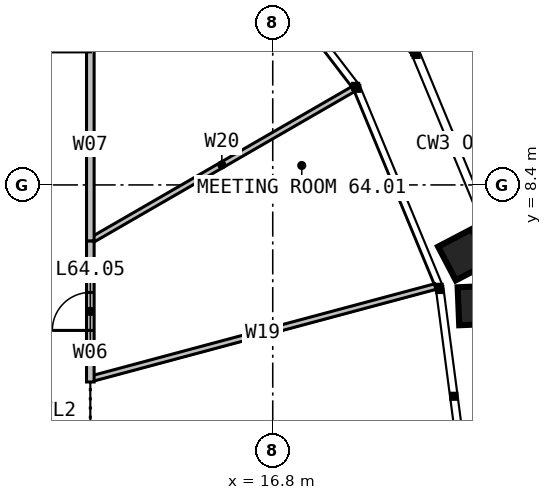
"""IFC4 building model, lengths in metres.
Left out: names, types, materials, properties, quantities, classifications, styles, units other than length and angle.
Written with IfcOpenShell. Run it as: python <this file> out.ifc"""

import sys

from ifc_helpers import new_model, si_unit, direction, frame, frame_2d, origin, place, context, subcontext, project, spatial, rectangle, extrude, element, fill, save


model = new_model("IFC4")
c1 = context("Model", 3, precision=1e-05, world=origin(), true_north=direction((0.0, 1.0)))
c2 = subcontext(c1, "Body", "Model", "MODEL_VIEW")
j1 = project(units=[si_unit("LENGTHUNIT", "METRE"), si_unit("PLANEANGLEUNIT", "RADIAN")], contexts=[c1])
p1 = place(None, origin())
s1 = spatial("IfcSite", under=j1, at=p1, CompositionType="ELEMENT")
p2 = place(p1, origin())
s2 = spatial("IfcBuilding", under=s1, at=p2, CompositionType="ELEMENT")
p3 = place(p2, frame((0.0, 0.0, 264.0)))
s3 = spatial("IfcBuildingStorey", under=s2, at=p3, CompositionType="ELEMENT", Elevation=264.0)
p4 = place(p3, frame((11.98, 3.288, 0.0), z_axis=(0.0, 0.0, 1.0), x_axis=(0.96592469552, 0.258823265155, 0.0)))
e1 = element("IfcWall", 1, at=p4, inside=s3, PredefinedType="PARTITIONING", context=c2, shape_type="SweptSolid", body=[
    extrude(rectangle(XDim=9.425, YDim=0.15, at=frame_2d((4.712, 0.0))), origin(), (0.0, 0.0, 1.0), 2.79),
])
p5 = place(p3, frame((12.0, 6.928, 0.0), z_axis=(0.0, 0.0, 1.0), x_axis=(0.86602940896, 0.499993062769, 0.0)))
e2 = element("IfcWall", 2, at=p5, inside=s3, PredefinedType="PARTITIONING", context=c2, shape_type="SweptSolid", body=[
    extrude(rectangle(XDim=7.992, YDim=0.15, at=frame_2d((3.996, 0.0))), origin(), (0.0, 0.0, 1.0), 2.79),
])
p6 = place(p3, frame((12.0, 3.215, 0.0), z_axis=(0.0, 0.0, 1.0), x_axis=(0.0, 1.0, 0.0)))
e3 = element("IfcWall", 3, at=p6, inside=s3, PredefinedType="PARTITIONING", context=c2, shape_type="SweptSolid", body=[
    extrude(rectangle(XDim=3.713, YDim=0.2, at=frame_2d((1.856, 0.0))), origin(), (0.0, 0.0, 1.0), 3.8),
])
p7 = place(p6, frame((1.356, 0.0, 0.0)))
e4 = element("IfcOpeningElement", 4, at=p7, cuts=e3, PredefinedType="OPENING", context=c2, shape_type="SweptSolid", body=[
    extrude(rectangle(XDim=1.0, YDim=2.2, at=frame_2d((0.5, 1.1))), frame((0.0, 0.11, 0.0), z_axis=(0.0, -1.0, 0.0), x_axis=(1.0, 0.0, 0.0)), (0.0, 0.0, 1.0), 0.22),
])
p8 = place(p3, frame((12.0, 6.928, 0.0), z_axis=(0.0, 0.0, 1.0), x_axis=(0.0, 1.0, 0.0)))
e5 = element("IfcWall", 5, at=p8, inside=s3, PredefinedType="PARTITIONING", context=c2, shape_type="SweptSolid", body=[
    extrude(rectangle(XDim=5.072, YDim=0.2, at=frame_2d((2.536, 0.0))), origin(), (0.0, 0.0, 1.0), 3.8),
])
p9 = place(p7, origin())
e6 = element("IfcDoor", 6, at=p9, inside=s3, OperationType="SINGLE_SWING_LEFT", PredefinedType="DOOR", context=c2, shape_type="SweptSolid", body=[
    extrude(rectangle(XDim=1.0, YDim=2.2, at=frame_2d((0.5, 1.1))), frame((0.0, 0.025, 0.0), z_axis=(0.0, -1.0, 0.0), x_axis=(1.0, 0.0, 0.0)), (0.0, 0.0, 1.0), 0.05),
])
fill(e4, e6)
save(model, sys.argv[1])
